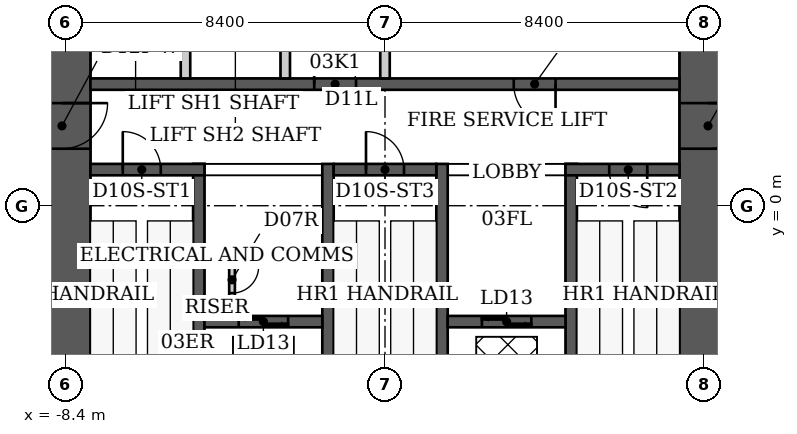
"""IFC4 building model, lengths in metres.
Left out: names, types, materials, properties, quantities, classifications, styles, units other than length and angle.
Written with IfcOpenShell. Run it as: python <this file> out.ifc"""

import sys

from ifc_helpers import new_model, si_unit, direction, frame, frame_2d, origin, place, context, subcontext, project, spatial, rectangle, extrude, element, fill, save


model = new_model("IFC4")
c1 = context("Model", 3, precision=1e-05, world=origin(), true_north=direction((0.0, 1.0)))
c2 = subcontext(c1, "Body", "Model", "MODEL_VIEW")
j1 = project(units=[si_unit("LENGTHUNIT", "METRE"), si_unit("PLANEANGLEUNIT", "RADIAN")], contexts=[c1])
p1 = place(None, origin())
s1 = spatial("IfcSite", under=j1, at=p1, CompositionType="ELEMENT")
p2 = place(p1, origin())
s2 = spatial("IfcBuilding", under=s1, at=p2, CompositionType="ELEMENT")
p3 = place(p2, frame((0.0, 0.0, 18.0)))
s3 = spatial("IfcBuildingStorey", under=s2, at=p3, CompositionType="ELEMENT", Elevation=18.0)
p4 = place(p3, frame((-8.5, -9.2, 0.0), z_axis=(0.0, 0.0, 1.0), x_axis=(0.0, 1.0, 0.0)))
e1 = element("IfcWall", 1, at=p4, inside=s3, PredefinedType="SHEAR", context=c2, shape_type="SweptSolid", body=[
    extrude(rectangle(XDim=15.3, YDim=1.5, at=frame_2d((7.65, 0.0))), origin(), (0.0, 0.0, 1.0), 5.0),
])
p5 = place(p4, frame((10.7, 0.0, 0.0)))
e2 = element("IfcOpeningElement", 2, at=p5, cuts=e1, PredefinedType="OPENING", context=c2, shape_type="SweptSolid", body=[
    extrude(rectangle(XDim=1.2, YDim=2.2, at=frame_2d((0.6, 1.1))), frame((0.0, 0.75, 0.0), z_axis=(0.0, -1.0, 0.0), x_axis=(1.0, 0.0, 0.0)), (0.0, 0.0, 1.0), 1.5),
])
p6 = place(p3, frame((8.5, -9.2, 0.0), z_axis=(0.0, 0.0, 1.0), x_axis=(0.0, 1.0, 0.0)))
e3 = element("IfcWall", 3, at=p6, inside=s3, PredefinedType="SHEAR", context=c2, shape_type="SweptSolid", body=[
    extrude(rectangle(XDim=15.3, YDim=1.5, at=frame_2d((7.65, 0.0))), origin(), (0.0, 0.0, 1.0), 5.0),
])
p7 = place(p6, frame((10.7, 0.0, 0.0)))
e4 = element("IfcOpeningElement", 4, at=p7, cuts=e3, PredefinedType="OPENING", context=c2, shape_type="SweptSolid", body=[
    extrude(rectangle(XDim=1.2, YDim=2.2, at=frame_2d((0.6, 1.1))), frame((0.0, 0.75, 0.0), z_axis=(0.0, -1.0, 0.0), x_axis=(1.0, 0.0, 0.0)), (0.0, 0.0, 1.0), 1.5),
])
for number, where, z_axis, x_axis in (
    (5, (-4.9, -6.1, 0.0), (0.0, 0.0, 1.0), (0.0, 1.0, 0.0)),
    (6, (-1.5, -6.1, 0.0), (0.0, 0.0, 1.0), (0.0, 1.0, 0.0)),
    (7, (1.5, -6.1, 0.0), (0.0, 0.0, 1.0), (0.0, 1.0, 0.0)),
    (8, (4.9, -6.1, 0.0), (0.0, 0.0, 1.0), (0.0, 1.0, 0.0)),
):
    element("IfcWall", number, at=place(p3, frame(where, z_axis=z_axis, x_axis=x_axis)), inside=s3, PredefinedType="SHEAR", context=c2, shape_type="SweptSolid", body=[
        extrude(rectangle(XDim=7.2, YDim=0.3, at=frame_2d((3.6, 0.0))), origin(), (0.0, 0.0, 1.0), 5.0),
    ])
p8 = place(p3, frame((-7.75, 0.95, 0.0), z_axis=(0.0, 0.0, 1.0), x_axis=(1.0, 0.0, 0.0)))
e9 = element("IfcWall", 9, at=p8, inside=s3, PredefinedType="SHEAR", context=c2, shape_type="SweptSolid", body=[
    extrude(rectangle(XDim=3.0, YDim=0.3, at=frame_2d((1.5, 0.0))), origin(), (0.0, 0.0, 1.0), 5.0),
])
p9 = place(p8, frame((0.85, 0.0, 0.0)))
e10 = element("IfcOpeningElement", 10, at=p9, cuts=e9, PredefinedType="OPENING", context=c2, shape_type="SweptSolid", body=[
    extrude(rectangle(XDim=1.0, YDim=2.2, at=frame_2d((0.5, 1.1))), frame((0.0, 0.15, 0.0), z_axis=(0.0, -1.0, 0.0), x_axis=(1.0, 0.0, 0.0)), (0.0, 0.0, 1.0), 0.3),
])
p10 = place(p3, frame((-1.35, 0.95, 0.0), z_axis=(0.0, 0.0, 1.0), x_axis=(1.0, 0.0, 0.0)))
e11 = element("IfcWall", 11, at=p10, inside=s3, PredefinedType="SHEAR", context=c2, shape_type="SweptSolid", body=[
    extrude(rectangle(XDim=2.7, YDim=0.3, at=frame_2d((1.35, 0.0))), origin(), (0.0, 0.0, 1.0), 5.0),
])
p11 = place(p10, frame((0.85, 0.0, 0.0)))
e12 = element("IfcOpeningElement", 12, at=p11, cuts=e11, PredefinedType="OPENING", context=c2, shape_type="SweptSolid", body=[
    extrude(rectangle(XDim=1.0, YDim=2.2, at=frame_2d((0.5, 1.1))), frame((0.0, 0.15, 0.0), z_axis=(0.0, -1.0, 0.0), x_axis=(1.0, 0.0, 0.0)), (0.0, 0.0, 1.0), 0.3),
])
p12 = place(p3, frame((4.75, 0.95, 0.0), z_axis=(0.0, 0.0, 1.0), x_axis=(1.0, 0.0, 0.0)))
e13 = element("IfcWall", 13, at=p12, inside=s3, PredefinedType="SHEAR", context=c2, shape_type="SweptSolid", body=[
    extrude(rectangle(XDim=3.0, YDim=0.3, at=frame_2d((1.5, 0.0))), origin(), (0.0, 0.0, 1.0), 5.0),
])
p13 = place(p12, frame((1.15, 0.0, 0.0)))
e14 = element("IfcOpeningElement", 14, at=p13, cuts=e13, PredefinedType="OPENING", context=c2, shape_type="SweptSolid", body=[
    extrude(rectangle(XDim=1.0, YDim=2.2, at=frame_2d((0.5, 1.1))), frame((0.0, 0.15, 0.0), z_axis=(0.0, -1.0, 0.0), x_axis=(1.0, 0.0, 0.0)), (0.0, 0.0, 1.0), 0.3),
])
p14 = place(p3, frame((-4.75, -3.05, 0.0), z_axis=(0.0, 0.0, 1.0), x_axis=(1.0, 0.0, 0.0)))
e15 = element("IfcWall", 15, at=p14, inside=s3, PredefinedType="SHEAR", context=c2, shape_type="SweptSolid", body=[
    extrude(rectangle(XDim=3.1, YDim=0.3, at=frame_2d((1.55, 0.0))), origin(), (0.0, 0.0, 1.0), 5.0),
])
p15 = place(p14, frame((0.9, 0.0, 0.0)))
e16 = element("IfcOpeningElement", 16, at=p15, cuts=e15, PredefinedType="OPENING", context=c2, shape_type="SweptSolid", body=[
    extrude(rectangle(XDim=1.3, YDim=2.1, at=frame_2d((0.65, 1.05))), frame((0.0, 0.15, 0.0), z_axis=(0.0, -1.0, 0.0), x_axis=(1.0, 0.0, 0.0)), (0.0, 0.0, 1.0), 0.3),
])
p16 = place(p3, frame((1.65, -3.05, 0.0), z_axis=(0.0, 0.0, 1.0), x_axis=(1.0, 0.0, 0.0)))
e17 = element("IfcWall", 17, at=p16, inside=s3, PredefinedType="SHEAR", context=c2, shape_type="SweptSolid", body=[
    extrude(rectangle(XDim=3.1, YDim=0.3, at=frame_2d((1.55, 0.0))), origin(), (0.0, 0.0, 1.0), 5.0),
])
p17 = place(p16, frame((0.9, 0.0, 0.0)))
e18 = element("IfcOpeningElement", 18, at=p17, cuts=e17, PredefinedType="OPENING", context=c2, shape_type="SweptSolid", body=[
    extrude(rectangle(XDim=1.3, YDim=2.1, at=frame_2d((0.65, 1.05))), frame((0.0, 0.15, 0.0), z_axis=(0.0, -1.0, 0.0), x_axis=(1.0, 0.0, 0.0)), (0.0, 0.0, 1.0), 0.3),
])
p18 = place(p3, frame((-7.75, 3.2, 0.0), z_axis=(0.0, 0.0, 1.0), x_axis=(1.0, 0.0, 0.0)))
e19 = element("IfcWall", 19, at=p18, inside=s3, PredefinedType="SHEAR", context=c2, shape_type="SweptSolid", body=[
    extrude(rectangle(XDim=15.5, YDim=0.3, at=frame_2d((7.75, 0.0))), origin(), (0.0, 0.0, 1.0), 5.0),
])
p19 = place(p18, frame((5.887, 0.0, 0.0)))
e20 = element("IfcOpeningElement", 20, at=p19, cuts=e19, PredefinedType="OPENING", context=c2, shape_type="SweptSolid", body=[
    extrude(rectangle(XDim=1.1, YDim=2.2, at=frame_2d((0.55, 1.1))), frame((0.0, 0.15, 0.0), z_axis=(0.0, -1.0, 0.0), x_axis=(1.0, 0.0, 0.0)), (0.0, 0.0, 1.0), 0.3),
])
p20 = place(p18, frame((11.137, 0.0, 0.0)))
e21 = element("IfcOpeningElement", 21, at=p20, cuts=e19, PredefinedType="OPENING", context=c2, shape_type="SweptSolid", body=[
    extrude(rectangle(XDim=1.1, YDim=2.2, at=frame_2d((0.55, 1.1))), frame((0.0, 0.15, 0.0), z_axis=(0.0, -1.0, 0.0), x_axis=(1.0, 0.0, 0.0)), (0.0, 0.0, 1.0), 0.3),
])
for number, where, z_axis, x_axis in (
    (22, (-5.25, 3.35, 0.0), (0.0, 0.0, 1.0), (0.0, 1.0, 0.0)),
    (23, (-2.625, 3.35, 0.0), (0.0, 0.0, 1.0), (0.0, 1.0, 0.0)),
    (24, (0.0, 3.35, 0.0), (0.0, 0.0, 1.0), (0.0, 1.0, 0.0)),
):
    element("IfcWall", number, at=place(p3, frame(where, z_axis=z_axis, x_axis=x_axis)), inside=s3, PredefinedType="PARTITIONING", context=c2, shape_type="SweptSolid", body=[
        extrude(rectangle(XDim=2.75, YDim=0.25, at=frame_2d((1.375, 0.0))), origin(), (0.0, 0.0, 1.0), 5.0),
    ])
p21 = place(p3, frame((-4.025, -2.9, 0.0), z_axis=(0.0, 0.0, 1.0), x_axis=(0.0, 1.0, 0.0)))
e25 = element("IfcWall", 25, at=p21, inside=s3, PredefinedType="PARTITIONING", context=c2, shape_type="SweptSolid", body=[
    extrude(rectangle(XDim=1.775, YDim=0.15, at=frame_2d((0.887, 0.0))), origin(), (0.0, 0.0, 1.0), 4.84),
])
p22 = place(p21, frame((0.6, 0.0, 0.0)))
e26 = element("IfcOpeningElement", 26, at=p22, cuts=e25, PredefinedType="OPENING", context=c2, shape_type="SweptSolid", body=[
    extrude(rectangle(XDim=0.7, YDim=2.1, at=frame_2d((0.35, 1.05))), frame((0.0, 0.075, 0.0), z_axis=(0.0, -1.0, 0.0), x_axis=(1.0, 0.0, 0.0)), (0.0, 0.0, 1.0), 0.15),
])
p23 = place(p3, frame((-4.75, -1.2, 0.0), z_axis=(0.0, 0.0, 1.0), x_axis=(1.0, 0.0, 0.0)))
e27 = element("IfcWall", 27, at=p23, inside=s3, PredefinedType="PARTITIONING", context=c2, shape_type="SweptSolid", body=[
    extrude(rectangle(XDim=0.8, YDim=0.15, at=frame_2d((0.4, 0.0))), origin(), (0.0, 0.0, 1.0), 4.84),
])
p24 = place(p9, origin())
e28 = element("IfcDoor", 28, at=p24, inside=s3, OperationType="SINGLE_SWING_LEFT", PredefinedType="DOOR", context=c2, shape_type="SweptSolid", body=[
    extrude(rectangle(XDim=1.0, YDim=2.2, at=frame_2d((0.5, 1.1))), frame((0.0, 0.025, 0.0), z_axis=(0.0, -1.0, 0.0), x_axis=(1.0, 0.0, 0.0)), (0.0, 0.0, 1.0), 0.05),
])
fill(e10, e28)
p25 = place(p11, origin())
e29 = element("IfcDoor", 29, at=p25, inside=s3, OperationType="SINGLE_SWING_LEFT", PredefinedType="DOOR", context=c2, shape_type="SweptSolid", body=[
    extrude(rectangle(XDim=1.0, YDim=2.2, at=frame_2d((0.5, 1.1))), frame((0.0, 0.025, 0.0), z_axis=(0.0, -1.0, 0.0), x_axis=(1.0, 0.0, 0.0)), (0.0, 0.0, 1.0), 0.05),
])
fill(e12, e29)
p26 = place(p13, origin())
e30 = element("IfcDoor", 30, at=p26, inside=s3, OperationType="SINGLE_SWING_RIGHT", PredefinedType="DOOR", context=c2, shape_type="SweptSolid", body=[
    extrude(rectangle(XDim=1.0, YDim=2.2, at=frame_2d((0.5, 1.1))), frame((0.0, 0.025, 0.0), z_axis=(0.0, -1.0, 0.0), x_axis=(1.0, 0.0, 0.0)), (0.0, 0.0, 1.0), 0.05),
])
fill(e14, e30)
p27 = place(p5, origin())
e31 = element("IfcDoor", 31, at=p27, inside=s3, OperationType="SINGLE_SWING_RIGHT", PredefinedType="DOOR", context=c2, shape_type="SweptSolid", body=[
    extrude(rectangle(XDim=1.2, YDim=2.2, at=frame_2d((0.6, 1.1))), frame((0.0, 0.025, 0.0), z_axis=(0.0, -1.0, 0.0), x_axis=(1.0, 0.0, 0.0)), (0.0, 0.0, 1.0), 0.05),
])
fill(e2, e31)
p28 = place(p7, origin())
e32 = element("IfcDoor", 32, at=p28, inside=s3, OperationType="SINGLE_SWING_RIGHT", PredefinedType="DOOR", context=c2, shape_type="SweptSolid", body=[
    extrude(rectangle(XDim=1.2, YDim=2.2, at=frame_2d((0.6, 1.1))), frame((0.0, 0.025, 0.0), z_axis=(0.0, -1.0, 0.0), x_axis=(1.0, 0.0, 0.0)), (0.0, 0.0, 1.0), 0.05),
])
fill(e4, e32)
p29 = place(p22, origin())
e33 = element("IfcDoor", 33, at=p29, inside=s3, OperationType="SINGLE_SWING_RIGHT", PredefinedType="DOOR", context=c2, shape_type="SweptSolid", body=[
    extrude(rectangle(XDim=0.7, YDim=2.1, at=frame_2d((0.35, 1.05))), frame((0.0, 0.025, 0.0), z_axis=(0.0, -1.0, 0.0), x_axis=(1.0, 0.0, 0.0)), (0.0, 0.0, 1.0), 0.05),
])
fill(e26, e33)
p30 = place(p19, origin())
e34 = element("IfcDoor", 34, at=p30, inside=s3, OperationType="SINGLE_SWING_LEFT", PredefinedType="DOOR", context=c2, shape_type="SweptSolid", body=[
    extrude(rectangle(XDim=1.1, YDim=2.2, at=frame_2d((0.55, 1.1))), frame((0.0, 0.025, 0.0), z_axis=(0.0, -1.0, 0.0), x_axis=(1.0, 0.0, 0.0)), (0.0, 0.0, 1.0), 0.05),
])
fill(e20, e34)
p31 = place(p20, origin())
e35 = element("IfcDoor", 35, at=p31, inside=s3, OperationType="SINGLE_SWING_RIGHT", PredefinedType="DOOR", context=c2, shape_type="SweptSolid", body=[
    extrude(rectangle(XDim=1.1, YDim=2.2, at=frame_2d((0.55, 1.1))), frame((0.0, 0.025, 0.0), z_axis=(0.0, -1.0, 0.0), x_axis=(1.0, 0.0, 0.0)), (0.0, 0.0, 1.0), 0.05),
])
fill(e21, e35)
p32 = place(p15, origin())
e36 = element("IfcDoor", 36, at=p32, inside=s3, OperationType="DOUBLE_DOOR_SLIDING", PredefinedType="DOOR", context=c2, shape_type="SweptSolid", body=[
    extrude(rectangle(XDim=1.3, YDim=2.1, at=frame_2d((0.65, 1.05))), frame((0.0, 0.025, 0.0), z_axis=(0.0, -1.0, 0.0), x_axis=(1.0, 0.0, 0.0)), (0.0, 0.0, 1.0), 0.05),
])
fill(e16, e36)
p33 = place(p17, origin())
e37 = element("IfcDoor", 37, at=p33, inside=s3, OperationType="DOUBLE_DOOR_SLIDING", PredefinedType="DOOR", context=c2, shape_type="SweptSolid", body=[
    extrude(rectangle(XDim=1.3, YDim=2.1, at=frame_2d((0.65, 1.05))), frame((0.0, 0.025, 0.0), z_axis=(0.0, -1.0, 0.0), x_axis=(1.0, 0.0, 0.0)), (0.0, 0.0, 1.0), 0.05),
])
fill(e18, e37)
save(model, sys.argv[1])
